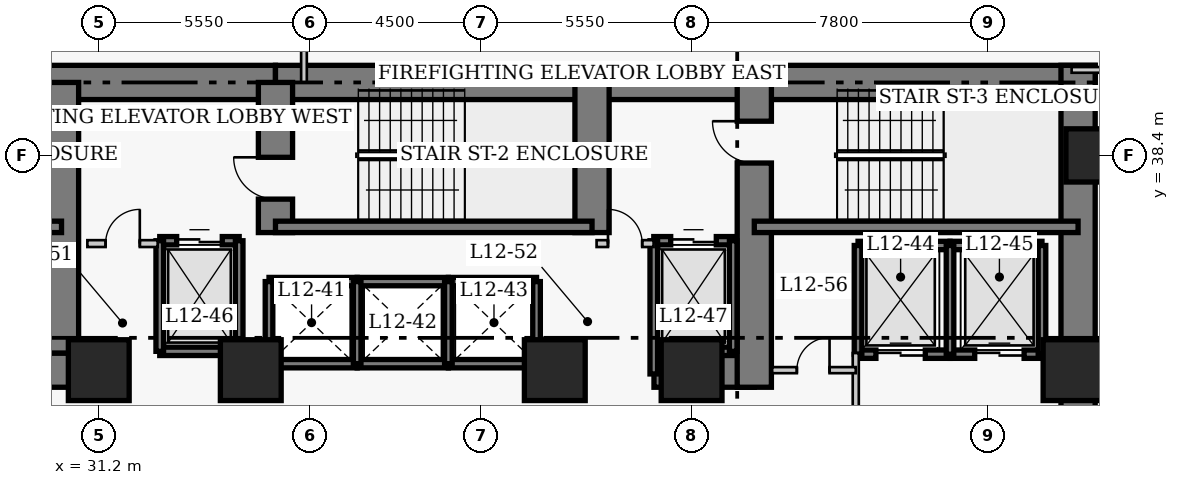
"""IFC4 building model, lengths in metres.
Left out: names, types, materials, properties, quantities, classifications, styles, units other than length and angle.
Written with IfcOpenShell. Run it as: python <this file> out.ifc"""

import sys

from ifc_helpers import new_model, si_unit, direction, frame, frame_2d, origin, origin_2d, place, context, subcontext, project, spatial, rectangle, extrude, element, fill, save


model = new_model("IFC4")
c1 = context("Model", 3, precision=1e-05, world=origin(), true_north=direction((0.0, 1.0)))
c2 = subcontext(c1, "Body", "Model", "MODEL_VIEW")
j1 = project(units=[si_unit("LENGTHUNIT", "METRE"), si_unit("PLANEANGLEUNIT", "RADIAN")], contexts=[c1])
p1 = place(None, origin())
s1 = spatial("IfcSite", under=j1, at=p1, CompositionType="ELEMENT")
p2 = place(p1, origin())
s2 = spatial("IfcBuilding", under=s1, at=p2, CompositionType="ELEMENT")
p3 = place(p2, frame((0.0, 0.0, 52.6)))
s3 = spatial("IfcBuildingStorey", under=s2, at=p3, CompositionType="ELEMENT", Elevation=52.6)
p4 = place(p3, frame((21.45, 40.32, 0.0), z_axis=(0.0, 0.0, 1.0), x_axis=(1.0, 0.0, 0.0)))
e1 = element("IfcWall", 1, at=p4, inside=s3, PredefinedType="SHEAR", context=c2, shape_type="SweptSolid", body=[
    extrude(rectangle(XDim=14.4, YDim=0.9, at=frame_2d((7.2, 0.0))), origin(), (0.0, 0.0, 1.0), 3.8),
])
p5 = place(p3, frame((35.85, 40.32, 0.0), z_axis=(0.0, 0.0, 1.0), x_axis=(1.0, 0.0, 0.0)))
e2 = element("IfcWall", 2, at=p5, inside=s3, PredefinedType="SHEAR", context=c2, shape_type="SweptSolid", body=[
    extrude(rectangle(XDim=12.6, YDim=0.9, at=frame_2d((6.3, 0.0))), origin(), (0.0, 0.0, 1.0), 3.8),
])
p6 = place(p3, frame((48.45, 40.32, 0.0), z_axis=(0.0, 0.0, 1.0), x_axis=(1.0, 0.0, 0.0)))
e3 = element("IfcWall", 3, at=p6, inside=s3, PredefinedType="SHEAR", context=c2, shape_type="SweptSolid", body=[
    extrude(rectangle(XDim=8.97, YDim=0.9, at=frame_2d((4.485, 0.0))), origin(), (0.0, 0.0, 1.0), 3.8),
])
p7 = place(p3, frame((56.97, 27.05, 0.0), z_axis=(0.0, 0.0, 1.0), x_axis=(0.0, 1.0, 0.0)))
e4 = element("IfcWall", 4, at=p7, inside=s3, PredefinedType="SHEAR", context=c2, shape_type="SweptSolid", body=[
    extrude(rectangle(XDim=13.72, YDim=0.9, at=frame_2d((6.86, 0.0))), origin(), (0.0, 0.0, 1.0), 3.8),
])
p8 = place(p3, frame((28.45, 32.75, 0.0), z_axis=(0.0, 0.0, 1.0), x_axis=(1.0, 0.0, 0.0)))
e5 = element("IfcWall", 5, at=p8, inside=s3, PredefinedType="SHEAR", context=c2, shape_type="SweptSolid", body=[
    extrude(rectangle(XDim=2.4, YDim=0.9, at=frame_2d((1.2, 0.0))), origin(), (0.0, 0.0, 1.0), 3.8),
])
p9 = place(p3, frame((45.81, 32.75, 0.0), z_axis=(0.0, 0.0, 1.0), x_axis=(1.0, 0.0, 0.0)))
e6 = element("IfcWall", 6, at=p9, inside=s3, PredefinedType="SHEAR", context=c2, shape_type="SweptSolid", body=[
    extrude(rectangle(XDim=2.64, YDim=0.9, at=frame_2d((1.32, 0.0))), origin(), (0.0, 0.0, 1.0), 3.8),
])
p10 = place(p3, frame((30.22, 33.2, 0.0), z_axis=(0.0, 0.0, 1.0), x_axis=(0.0, 1.0, 0.0)))
e7 = element("IfcWall", 7, at=p10, inside=s3, PredefinedType="SHEAR", context=c2, shape_type="SweptSolid", body=[
    extrude(rectangle(XDim=7.12, YDim=0.9, at=frame_2d((3.56, 0.0))), origin(), (0.0, 0.0, 1.0), 3.8),
])
p11 = place(p3, frame((35.85, 36.37, 0.0), z_axis=(0.0, 0.0, 1.0), x_axis=(0.0, 1.0, 0.0)))
e8 = element("IfcWall", 8, at=p11, inside=s3, PredefinedType="SHEAR", context=c2, shape_type="SweptSolid", body=[
    extrude(rectangle(XDim=3.95, YDim=0.9, at=frame_2d((1.975, 0.0))), origin(), (0.0, 0.0, 1.0), 3.8),
])
p12 = place(p11, frame((0.88, 0.0, 0.0)))
e9 = element("IfcOpeningElement", 9, at=p12, cuts=e8, PredefinedType="OPENING", context=c2, shape_type="SweptSolid", body=[
    extrude(rectangle(XDim=1.1, YDim=2.15, at=frame_2d((0.55, 1.075))), frame((0.0, 0.46, 0.0), z_axis=(0.0, -1.0, 0.0), x_axis=(1.0, 0.0, 0.0)), (0.0, 0.0, 1.0), 0.92),
])
p13 = place(p3, frame((44.18, 36.37, 0.0), z_axis=(0.0, 0.0, 1.0), x_axis=(0.0, 1.0, 0.0)))
e10 = element("IfcWall", 10, at=p13, inside=s3, PredefinedType="SHEAR", context=c2, shape_type="SweptSolid", body=[
    extrude(rectangle(XDim=3.95, YDim=0.9, at=frame_2d((1.975, 0.0))), origin(), (0.0, 0.0, 1.0), 3.8),
])
p14 = place(p3, frame((48.45, 32.3, 0.0), z_axis=(0.0, 0.0, 1.0), x_axis=(0.0, 1.0, 0.0)))
e11 = element("IfcWall", 11, at=p14, inside=s3, PredefinedType="SHEAR", context=c2, shape_type="SweptSolid", body=[
    extrude(rectangle(XDim=8.02, YDim=0.9, at=frame_2d((4.01, 0.0))), origin(), (0.0, 0.0, 1.0), 3.8),
])
p15 = place(p14, frame((5.9, 0.0, 0.0)))
e12 = element("IfcOpeningElement", 12, at=p15, cuts=e11, PredefinedType="OPENING", context=c2, shape_type="SweptSolid", body=[
    extrude(rectangle(XDim=1.1, YDim=2.15, at=frame_2d((0.55, 1.075))), frame((0.0, 0.46, 0.0), z_axis=(0.0, -1.0, 0.0), x_axis=(1.0, 0.0, 0.0)), (0.0, 0.0, 1.0), 0.92),
])
p16 = place(p3, frame((21.9, 36.52, 0.0), z_axis=(0.0, 0.0, 1.0), x_axis=(1.0, 0.0, 0.0)))
e13 = element("IfcWall", 13, at=p16, inside=s3, PredefinedType="SHEAR", context=c2, shape_type="SweptSolid", body=[
    extrude(rectangle(XDim=8.32, YDim=0.3, at=frame_2d((4.16, 0.0))), origin(), (0.0, 0.0, 1.0), 3.8),
])
p17 = place(p16, frame((0.9, 0.0, 0.0)))
e14 = element("IfcOpeningElement", 14, at=p17, cuts=e13, PredefinedType="OPENING", context=c2, shape_type="SweptSolid", body=[
    extrude(rectangle(XDim=1.1, YDim=2.15, at=frame_2d((0.55, 1.075))), frame((0.0, 0.16, 0.0), z_axis=(0.0, -1.0, 0.0), x_axis=(1.0, 0.0, 0.0)), (0.0, 0.0, 1.0), 0.32),
])
p18 = place(p3, frame((35.85, 36.52, 0.0), z_axis=(0.0, 0.0, 1.0), x_axis=(1.0, 0.0, 0.0)))
e15 = element("IfcWall", 15, at=p18, inside=s3, PredefinedType="SHEAR", context=c2, shape_type="SweptSolid", body=[
    extrude(rectangle(XDim=8.33, YDim=0.3, at=frame_2d((4.165, 0.0))), origin(), (0.0, 0.0, 1.0), 3.8),
])
p19 = place(p3, frame((48.45, 36.52, 0.0), z_axis=(0.0, 0.0, 1.0), x_axis=(1.0, 0.0, 0.0)))
e16 = element("IfcWall", 16, at=p19, inside=s3, PredefinedType="SHEAR", context=c2, shape_type="SweptSolid", body=[
    extrude(rectangle(XDim=8.52, YDim=0.3, at=frame_2d((4.26, 0.0))), origin(), (0.0, 0.0, 1.0), 3.8),
])
p20 = place(p3, frame((57.35, 38.4, 0.0), z_axis=(0.0, 0.0, 1.0), x_axis=(1.0, 0.0, 0.0)))
e17 = element("IfcColumn", 17, at=p20, inside=s3, PredefinedType="COLUMN", context=c2, shape_type="SweptSolid", body=[
    extrude(rectangle(XDim=1.4, YDim=1.4, at=origin_2d()), origin(), (0.0, 0.0, 1.0), 3.8),
])
for number, where, z_axis, x_axis in (
    (18, (31.2, 32.75, 0.0), (0.0, 0.0, 1.0), (1.0, 0.0, 0.0)),
    (19, (35.2, 32.75, 0.0), (0.0, 0.0, 1.0), (1.0, 0.0, 0.0)),
    (20, (43.2, 32.75, 0.0), (0.0, 0.0, 1.0), (1.0, 0.0, 0.0)),
    (21, (46.8, 32.75, 0.0), (0.0, 0.0, 1.0), (1.0, 0.0, 0.0)),
    (22, (56.85, 32.75, 0.0), (0.0, 0.0, 1.0), (1.0, 0.0, 0.0)),
):
    element("IfcColumn", number, at=place(p3, frame(where, z_axis=z_axis, x_axis=x_axis)), inside=s3, PredefinedType="COLUMN", context=c2, shape_type="SweptSolid", body=[
        extrude(rectangle(XDim=1.6, YDim=1.6, at=origin_2d()), origin(), (0.0, 0.0, 1.0), 3.8),
    ])
for number, where, z_axis, x_axis in (
    (23, (35.68, 35.08, 0.0), (0.0, 0.0, 1.0), (1.0, 0.0, 0.0)),
    (24, (35.68, 32.92, 0.0), (0.0, 0.0, 1.0), (1.0, 0.0, 0.0)),
):
    element("IfcWall", number, at=place(p3, frame(where, z_axis=z_axis, x_axis=x_axis)), inside=s3, PredefinedType="SHEAR", context=c2, shape_type="SweptSolid", body=[
        extrude(rectangle(XDim=2.32, YDim=0.22, at=frame_2d((1.16, 0.0))), origin(), (0.0, 0.0, 1.0), 3.8),
    ])
p21 = place(p3, frame((35.68, 32.92, 0.0), z_axis=(0.0, 0.0, 1.0), x_axis=(0.0, 1.0, 0.0)))
e25 = element("IfcWall", 25, at=p21, inside=s3, PredefinedType="SHEAR", context=c2, shape_type="SweptSolid", body=[
    extrude(rectangle(XDim=2.16, YDim=0.2, at=frame_2d((1.08, 0.0))), origin(), (0.0, 0.0, 1.0), 3.8),
])
for number, where, z_axis, x_axis in (
    (26, (38.0, 35.08, 0.0), (0.0, 0.0, 1.0), (1.0, 0.0, 0.0)),
    (27, (38.0, 32.92, 0.0), (0.0, 0.0, 1.0), (1.0, 0.0, 0.0)),
):
    element("IfcWall", number, at=place(p3, frame(where, z_axis=z_axis, x_axis=x_axis)), inside=s3, PredefinedType="SHEAR", context=c2, shape_type="SweptSolid", body=[
        extrude(rectangle(XDim=2.4, YDim=0.22, at=frame_2d((1.2, 0.0))), origin(), (0.0, 0.0, 1.0), 3.8),
    ])
p22 = place(p3, frame((38.0, 32.92, 0.0), z_axis=(0.0, 0.0, 1.0), x_axis=(0.0, 1.0, 0.0)))
e28 = element("IfcWall", 28, at=p22, inside=s3, PredefinedType="SHEAR", context=c2, shape_type="SweptSolid", body=[
    extrude(rectangle(XDim=2.16, YDim=0.2, at=frame_2d((1.08, 0.0))), origin(), (0.0, 0.0, 1.0), 3.8),
])
for number, where, z_axis, x_axis in (
    (29, (40.4, 35.08, 0.0), (0.0, 0.0, 1.0), (1.0, 0.0, 0.0)),
    (30, (40.4, 32.92, 0.0), (0.0, 0.0, 1.0), (1.0, 0.0, 0.0)),
):
    element("IfcWall", number, at=place(p3, frame(where, z_axis=z_axis, x_axis=x_axis)), inside=s3, PredefinedType="SHEAR", context=c2, shape_type="SweptSolid", body=[
        extrude(rectangle(XDim=2.32, YDim=0.22, at=frame_2d((1.16, 0.0))), origin(), (0.0, 0.0, 1.0), 3.8),
    ])
for number, where, z_axis, x_axis in (
    (31, (40.4, 32.92, 0.0), (0.0, 0.0, 1.0), (0.0, 1.0, 0.0)),
    (32, (42.72, 32.92, 0.0), (0.0, 0.0, 1.0), (0.0, 1.0, 0.0)),
):
    element("IfcWall", number, at=place(p3, frame(where, z_axis=z_axis, x_axis=x_axis)), inside=s3, PredefinedType="SHEAR", context=c2, shape_type="SweptSolid", body=[
        extrude(rectangle(XDim=2.16, YDim=0.2, at=frame_2d((1.08, 0.0))), origin(), (0.0, 0.0, 1.0), 3.8),
    ])
p23 = place(p3, frame((51.18, 36.03, 0.0), z_axis=(0.0, 0.0, 1.0), x_axis=(1.0, 0.0, 0.0)))
e33 = element("IfcWall", 33, at=p23, inside=s3, PredefinedType="SHEAR", context=c2, shape_type="SweptSolid", body=[
    extrude(rectangle(XDim=2.42, YDim=0.22, at=frame_2d((1.21, 0.0))), origin(), (0.0, 0.0, 1.0), 3.8),
])
p24 = place(p3, frame((51.18, 33.17, 0.0), z_axis=(0.0, 0.0, 1.0), x_axis=(1.0, 0.0, 0.0)))
e34 = element("IfcWall", 34, at=p24, inside=s3, PredefinedType="SHEAR", context=c2, shape_type="SweptSolid", body=[
    extrude(rectangle(XDim=2.42, YDim=0.22, at=frame_2d((1.21, 0.0))), origin(), (0.0, 0.0, 1.0), 3.8),
])
p25 = place(p24, frame((0.47, 0.0, 0.0)))
e35 = element("IfcOpeningElement", 35, at=p25, cuts=e34, PredefinedType="OPENING", context=c2, shape_type="SweptSolid", body=[
    extrude(rectangle(XDim=1.3, YDim=2.15, at=frame_2d((0.65, 1.075))), frame((0.0, 0.12, 0.0), z_axis=(0.0, -1.0, 0.0), x_axis=(1.0, 0.0, 0.0)), (0.0, 0.0, 1.0), 0.24),
])
p26 = place(p3, frame((51.18, 33.17, 0.0), z_axis=(0.0, 0.0, 1.0), x_axis=(0.0, 1.0, 0.0)))
e36 = element("IfcWall", 36, at=p26, inside=s3, PredefinedType="SHEAR", context=c2, shape_type="SweptSolid", body=[
    extrude(rectangle(XDim=2.86, YDim=0.2, at=frame_2d((1.43, 0.0))), origin(), (0.0, 0.0, 1.0), 3.8),
])
p27 = place(p3, frame((53.6, 36.03, 0.0), z_axis=(0.0, 0.0, 1.0), x_axis=(1.0, 0.0, 0.0)))
e37 = element("IfcWall", 37, at=p27, inside=s3, PredefinedType="SHEAR", context=c2, shape_type="SweptSolid", body=[
    extrude(rectangle(XDim=2.42, YDim=0.22, at=frame_2d((1.21, 0.0))), origin(), (0.0, 0.0, 1.0), 3.8),
])
p28 = place(p3, frame((53.6, 33.17, 0.0), z_axis=(0.0, 0.0, 1.0), x_axis=(1.0, 0.0, 0.0)))
e38 = element("IfcWall", 38, at=p28, inside=s3, PredefinedType="SHEAR", context=c2, shape_type="SweptSolid", body=[
    extrude(rectangle(XDim=2.42, YDim=0.22, at=frame_2d((1.21, 0.0))), origin(), (0.0, 0.0, 1.0), 3.8),
])
p29 = place(p28, frame((0.65, 0.0, 0.0)))
e39 = element("IfcOpeningElement", 39, at=p29, cuts=e38, PredefinedType="OPENING", context=c2, shape_type="SweptSolid", body=[
    extrude(rectangle(XDim=1.3, YDim=2.15, at=frame_2d((0.65, 1.075))), frame((0.0, 0.12, 0.0), z_axis=(0.0, -1.0, 0.0), x_axis=(1.0, 0.0, 0.0)), (0.0, 0.0, 1.0), 0.24),
])
for number, where, z_axis, x_axis in (
    (40, (53.6, 33.17, 0.0), (0.0, 0.0, 1.0), (0.0, 1.0, 0.0)),
    (41, (56.02, 33.17, 0.0), (0.0, 0.0, 1.0), (0.0, 1.0, 0.0)),
):
    element("IfcWall", number, at=place(p3, frame(where, z_axis=z_axis, x_axis=x_axis)), inside=s3, PredefinedType="SHEAR", context=c2, shape_type="SweptSolid", body=[
        extrude(rectangle(XDim=2.86, YDim=0.2, at=frame_2d((1.43, 0.0))), origin(), (0.0, 0.0, 1.0), 3.8),
    ])
p30 = place(p3, frame((32.805, 36.155, 0.0), z_axis=(0.0, 0.0, 1.0), x_axis=(1.0, 0.0, 0.0)))
e42 = element("IfcWall", 42, at=p30, inside=s3, PredefinedType="SHEAR", context=c2, shape_type="SweptSolid", body=[
    extrude(rectangle(XDim=2.09, YDim=0.22, at=frame_2d((1.045, 0.0))), origin(), (0.0, 0.0, 1.0), 3.8),
])
p31 = place(p30, frame((0.445, 0.0, 0.0)))
e43 = element("IfcOpeningElement", 43, at=p31, cuts=e42, PredefinedType="OPENING", context=c2, shape_type="SweptSolid", body=[
    extrude(rectangle(XDim=1.2, YDim=2.15, at=frame_2d((0.6, 1.075))), frame((0.0, 0.12, 0.0), z_axis=(0.0, -1.0, 0.0), x_axis=(1.0, 0.0, 0.0)), (0.0, 0.0, 1.0), 0.24),
])
p32 = place(p3, frame((32.805, 33.245, 0.0), z_axis=(0.0, 0.0, 1.0), x_axis=(1.0, 0.0, 0.0)))
e44 = element("IfcWall", 44, at=p32, inside=s3, PredefinedType="SHEAR", context=c2, shape_type="SweptSolid", body=[
    extrude(rectangle(XDim=2.09, YDim=0.22, at=frame_2d((1.045, 0.0))), origin(), (0.0, 0.0, 1.0), 3.8),
])
for number, where, z_axis, x_axis in (
    (45, (32.805, 33.245, 0.0), (0.0, 0.0, 1.0), (0.0, 1.0, 0.0)),
    (46, (34.895, 33.245, 0.0), (0.0, 0.0, 1.0), (0.0, 1.0, 0.0)),
):
    element("IfcWall", number, at=place(p3, frame(where, z_axis=z_axis, x_axis=x_axis)), inside=s3, PredefinedType="SHEAR", context=c2, shape_type="SweptSolid", body=[
        extrude(rectangle(XDim=2.91, YDim=0.2, at=frame_2d((1.455, 0.0))), origin(), (0.0, 0.0, 1.0), 3.8),
    ])
p33 = place(p3, frame((45.805, 36.155, 0.0), z_axis=(0.0, 0.0, 1.0), x_axis=(1.0, 0.0, 0.0)))
e47 = element("IfcWall", 47, at=p33, inside=s3, PredefinedType="SHEAR", context=c2, shape_type="SweptSolid", body=[
    extrude(rectangle(XDim=2.09, YDim=0.22, at=frame_2d((1.045, 0.0))), origin(), (0.0, 0.0, 1.0), 3.8),
])
p34 = place(p33, frame((0.445, 0.0, 0.0)))
e48 = element("IfcOpeningElement", 48, at=p34, cuts=e47, PredefinedType="OPENING", context=c2, shape_type="SweptSolid", body=[
    extrude(rectangle(XDim=1.2, YDim=2.15, at=frame_2d((0.6, 1.075))), frame((0.0, 0.12, 0.0), z_axis=(0.0, -1.0, 0.0), x_axis=(1.0, 0.0, 0.0)), (0.0, 0.0, 1.0), 0.24),
])
p35 = place(p3, frame((45.805, 33.245, 0.0), z_axis=(0.0, 0.0, 1.0), x_axis=(1.0, 0.0, 0.0)))
e49 = element("IfcWall", 49, at=p35, inside=s3, PredefinedType="SHEAR", context=c2, shape_type="SweptSolid", body=[
    extrude(rectangle(XDim=2.09, YDim=0.22, at=frame_2d((1.045, 0.0))), origin(), (0.0, 0.0, 1.0), 3.8),
])
p36 = place(p3, frame((45.805, 32.65, 0.0), z_axis=(0.0, 0.0, 1.0), x_axis=(0.0, 1.0, 0.0)))
e50 = element("IfcWall", 50, at=p36, inside=s3, PredefinedType="SHEAR", context=c2, shape_type="SweptSolid", body=[
    extrude(rectangle(XDim=3.505, YDim=0.2, at=frame_2d((1.752, 0.0))), origin(), (0.0, 0.0, 1.0), 3.8),
])
p37 = place(p3, frame((47.895, 33.245, 0.0), z_axis=(0.0, 0.0, 1.0), x_axis=(0.0, 1.0, 0.0)))
e51 = element("IfcWall", 51, at=p37, inside=s3, PredefinedType="SHEAR", context=c2, shape_type="SweptSolid", body=[
    extrude(rectangle(XDim=2.91, YDim=0.2, at=frame_2d((1.455, 0.0))), origin(), (0.0, 0.0, 1.0), 3.8),
])
p38 = place(p3, frame((30.9, 36.08, 0.0), z_axis=(0.0, 0.0, 1.0), x_axis=(1.0, 0.0, 0.0)))
e52 = element("IfcWall", 52, at=p38, inside=s3, PredefinedType="PARTITIONING", context=c2, shape_type="SweptSolid", body=[
    extrude(rectangle(XDim=1.85, YDim=0.18, at=frame_2d((0.925, 0.0))), origin(), (0.0, 0.0, 1.0), 3.54),
])
p39 = place(p38, frame((0.48, 0.0, 0.0)))
e53 = element("IfcOpeningElement", 53, at=p39, cuts=e52, PredefinedType="OPENING", context=c2, shape_type="SweptSolid", body=[
    extrude(rectangle(XDim=0.9, YDim=2.15, at=frame_2d((0.45, 1.075))), frame((0.0, 0.1, 0.0), z_axis=(0.0, -1.0, 0.0), x_axis=(1.0, 0.0, 0.0)), (0.0, 0.0, 1.0), 0.2),
])
p40 = place(p3, frame((44.3, 36.08, 0.0), z_axis=(0.0, 0.0, 1.0), x_axis=(1.0, 0.0, 0.0)))
e54 = element("IfcWall", 54, at=p40, inside=s3, PredefinedType="PARTITIONING", context=c2, shape_type="SweptSolid", body=[
    extrude(rectangle(XDim=1.5, YDim=0.18, at=frame_2d((0.75, 0.0))), origin(), (0.0, 0.0, 1.0), 3.54),
])
p41 = place(p40, frame((0.3, 0.0, 0.0)))
e55 = element("IfcOpeningElement", 55, at=p41, cuts=e54, PredefinedType="OPENING", context=c2, shape_type="SweptSolid", body=[
    extrude(rectangle(XDim=0.9, YDim=2.15, at=frame_2d((0.45, 1.075))), frame((0.0, 0.1, 0.0), z_axis=(0.0, -1.0, 0.0), x_axis=(1.0, 0.0, 0.0)), (0.0, 0.0, 1.0), 0.2),
])
p42 = place(p3, frame((51.12, 29.5, 0.0), z_axis=(0.0, 0.0, 1.0), x_axis=(0.0, 1.0, 0.0)))
e56 = element("IfcWall", 56, at=p42, inside=s3, PredefinedType="PARTITIONING", context=c2, shape_type="SweptSolid", body=[
    extrude(rectangle(XDim=3.7, YDim=0.16, at=frame_2d((1.85, 0.0))), origin(), (0.0, 0.0, 1.0), 3.54),
])
p43 = place(p42, frame((0.9, 0.0, 0.0)))
e57 = element("IfcOpeningElement", 57, at=p43, cuts=e56, PredefinedType="OPENING", context=c2, shape_type="SweptSolid", body=[
    extrude(rectangle(XDim=1.1, YDim=2.15, at=frame_2d((0.55, 1.075))), frame((0.0, 0.09, 0.0), z_axis=(0.0, -1.0, 0.0), x_axis=(1.0, 0.0, 0.0)), (0.0, 0.0, 1.0), 0.18),
])
p44 = place(p3, frame((48.92, 32.75, 0.0), z_axis=(0.0, 0.0, 1.0), x_axis=(1.0, 0.0, 0.0)))
e58 = element("IfcWall", 58, at=p44, inside=s3, PredefinedType="PARTITIONING", context=c2, shape_type="SweptSolid", body=[
    extrude(rectangle(XDim=2.2, YDim=0.16, at=frame_2d((1.1, 0.0))), origin(), (0.0, 0.0, 1.0), 3.54),
])
p45 = place(p44, frame((0.65, 0.0, 0.0)))
e59 = element("IfcOpeningElement", 59, at=p45, cuts=e58, PredefinedType="OPENING", context=c2, shape_type="SweptSolid", body=[
    extrude(rectangle(XDim=0.86, YDim=2.05, at=frame_2d((0.43, 1.025))), frame((0.0, 0.09, 0.0), z_axis=(0.0, -1.0, 0.0), x_axis=(1.0, 0.0, 0.0)), (0.0, 0.0, 1.0), 0.18),
])
p46 = place(p3, frame((56.8, 40.65, 0.0), z_axis=(0.0, 0.0, 1.0), x_axis=(1.0, 0.0, 0.0)))
e60 = element("IfcWall", 60, at=p46, inside=s3, PredefinedType="PARTITIONING", context=c2, shape_type="SweptSolid", body=[
    extrude(rectangle(XDim=4.66, YDim=0.15, at=frame_2d((2.33, 0.0))), origin(), (0.0, 0.0, 1.0), 3.54),
])
p47 = place(p46, frame((3.05, 0.0, 0.0)))
e61 = element("IfcOpeningElement", 61, at=p47, cuts=e60, PredefinedType="OPENING", context=c2, shape_type="SweptSolid", body=[
    extrude(rectangle(XDim=1.0, YDim=2.15, at=frame_2d((0.5, 1.075))), frame((0.0, 0.085, 0.0), z_axis=(0.0, -1.0, 0.0), x_axis=(1.0, 0.0, 0.0)), (0.0, 0.0, 1.0), 0.17),
])
p48 = place(p3, frame((36.6, 40.32, 0.0), z_axis=(0.0, 0.0, 1.0), x_axis=(0.0, 1.0, 0.0)))
e62 = element("IfcWall", 62, at=p48, inside=s3, PredefinedType="PARTITIONING", context=c2, shape_type="SweptSolid", body=[
    extrude(rectangle(XDim=5.045, YDim=0.15, at=frame_2d((2.522, 0.0))), origin(), (0.0, 0.0, 1.0), 3.54),
])
p49 = place(p25, origin())
e63 = element("IfcDoor", 63, at=p49, inside=s3, OperationType="DOUBLE_DOOR_SLIDING", PredefinedType="DOOR", context=c2, shape_type="SweptSolid", body=[
    extrude(rectangle(XDim=1.3, YDim=2.15, at=frame_2d((0.65, 1.075))), frame((0.0, 0.025, 0.0), z_axis=(0.0, -1.0, 0.0), x_axis=(1.0, 0.0, 0.0)), (0.0, 0.0, 1.0), 0.05),
])
fill(e35, e63)
p50 = place(p29, origin())
e64 = element("IfcDoor", 64, at=p50, inside=s3, OperationType="DOUBLE_DOOR_SLIDING", PredefinedType="DOOR", context=c2, shape_type="SweptSolid", body=[
    extrude(rectangle(XDim=1.3, YDim=2.15, at=frame_2d((0.65, 1.075))), frame((0.0, 0.025, 0.0), z_axis=(0.0, -1.0, 0.0), x_axis=(1.0, 0.0, 0.0)), (0.0, 0.0, 1.0), 0.05),
])
fill(e39, e64)
p51 = place(p31, origin())
e65 = element("IfcDoor", 65, at=p51, inside=s3, OperationType="DOUBLE_DOOR_SLIDING", PredefinedType="DOOR", context=c2, shape_type="SweptSolid", body=[
    extrude(rectangle(XDim=1.2, YDim=2.15, at=frame_2d((0.6, 1.075))), frame((0.0, 0.025, 0.0), z_axis=(0.0, -1.0, 0.0), x_axis=(1.0, 0.0, 0.0)), (0.0, 0.0, 1.0), 0.05),
])
fill(e43, e65)
p52 = place(p34, origin())
e66 = element("IfcDoor", 66, at=p52, inside=s3, OperationType="DOUBLE_DOOR_SLIDING", PredefinedType="DOOR", context=c2, shape_type="SweptSolid", body=[
    extrude(rectangle(XDim=1.2, YDim=2.15, at=frame_2d((0.6, 1.075))), frame((0.0, 0.025, 0.0), z_axis=(0.0, -1.0, 0.0), x_axis=(1.0, 0.0, 0.0)), (0.0, 0.0, 1.0), 0.05),
])
fill(e48, e66)
p53 = place(p39, origin())
e67 = element("IfcDoor", 67, at=p53, inside=s3, OperationType="SINGLE_SWING_RIGHT", PredefinedType="DOOR", context=c2, shape_type="SweptSolid", body=[
    extrude(rectangle(XDim=0.9, YDim=2.15, at=frame_2d((0.45, 1.075))), frame((0.0, 0.025, 0.0), z_axis=(0.0, -1.0, 0.0), x_axis=(1.0, 0.0, 0.0)), (0.0, 0.0, 1.0), 0.05),
])
fill(e53, e67)
p54 = place(p41, origin())
e68 = element("IfcDoor", 68, at=p54, inside=s3, OperationType="SINGLE_SWING_LEFT", PredefinedType="DOOR", context=c2, shape_type="SweptSolid", body=[
    extrude(rectangle(XDim=0.9, YDim=2.15, at=frame_2d((0.45, 1.075))), frame((0.0, 0.025, 0.0), z_axis=(0.0, -1.0, 0.0), x_axis=(1.0, 0.0, 0.0)), (0.0, 0.0, 1.0), 0.05),
])
fill(e55, e68)
p55 = place(p45, origin())
e69 = element("IfcDoor", 69, at=p55, inside=s3, OperationType="SINGLE_SWING_RIGHT", PredefinedType="DOOR", context=c2, shape_type="SweptSolid", body=[
    extrude(rectangle(XDim=0.86, YDim=2.05, at=frame_2d((0.43, 1.025))), frame((0.0, 0.025, 0.0), z_axis=(0.0, -1.0, 0.0), x_axis=(1.0, 0.0, 0.0)), (0.0, 0.0, 1.0), 0.05),
])
fill(e59, e69)
p56 = place(p12, origin())
e70 = element("IfcDoor", 70, at=p56, inside=s3, OperationType="SINGLE_SWING_RIGHT", PredefinedType="DOOR", context=c2, shape_type="SweptSolid", body=[
    extrude(rectangle(XDim=1.1, YDim=2.15, at=frame_2d((0.55, 1.075))), frame((0.0, 0.025, 0.0), z_axis=(0.0, -1.0, 0.0), x_axis=(1.0, 0.0, 0.0)), (0.0, 0.0, 1.0), 0.05),
])
fill(e9, e70)
p57 = place(p15, origin())
e71 = element("IfcDoor", 71, at=p57, inside=s3, OperationType="SINGLE_SWING_RIGHT", PredefinedType="DOOR", context=c2, shape_type="SweptSolid", body=[
    extrude(rectangle(XDim=1.1, YDim=2.15, at=frame_2d((0.55, 1.075))), frame((0.0, 0.025, 0.0), z_axis=(0.0, -1.0, 0.0), x_axis=(1.0, 0.0, 0.0)), (0.0, 0.0, 1.0), 0.05),
])
fill(e12, e71)
save(model, sys.argv[1])
